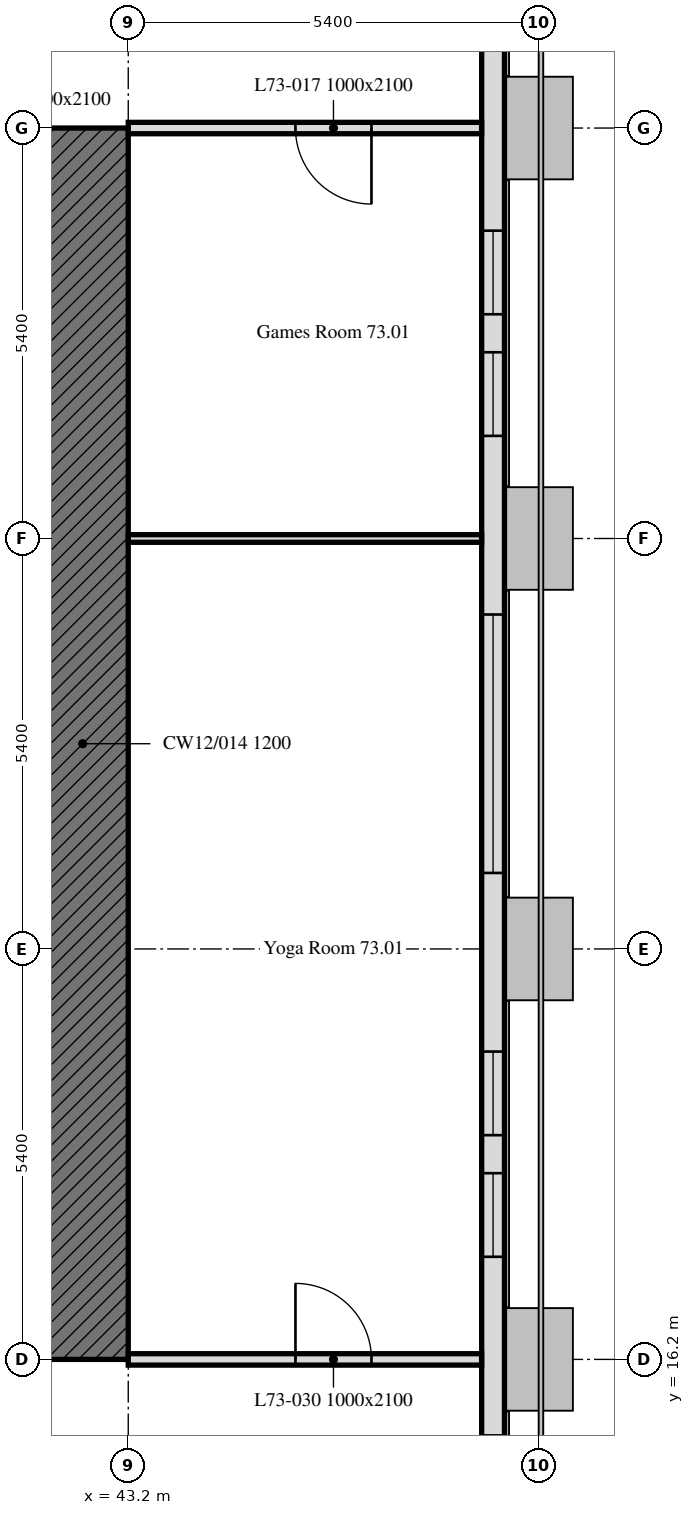
"""IFC4 building model, lengths in metres.
Left out: names, types, materials, properties, quantities, classifications, styles, units other than length and angle.
Written with IfcOpenShell. Run it as: python <this file> out.ifc"""

import sys

from ifc_helpers import new_model, si_unit, direction, frame, frame_2d, origin, place, context, subcontext, project, spatial, rectangle, extrude, element, fill, save


model = new_model("IFC4")
c1 = context("Model", 3, precision=1e-05, world=origin(), true_north=direction((0.0, 1.0)))
c2 = subcontext(c1, "Body", "Model", "MODEL_VIEW")
j1 = project(units=[si_unit("LENGTHUNIT", "METRE"), si_unit("PLANEANGLEUNIT", "RADIAN")], contexts=[c1])
p1 = place(None, origin())
s1 = spatial("IfcSite", under=j1, at=p1, CompositionType="ELEMENT")
p2 = place(p1, origin())
s2 = spatial("IfcBuilding", under=s1, at=p2, CompositionType="ELEMENT")
p3 = place(p2, frame((0.0, 0.0, 295.0)))
s3 = spatial("IfcBuildingStorey", under=s2, at=p3, CompositionType="ELEMENT", Elevation=295.0)
p4 = place(p3, frame((48.0, 10.986, 0.0), z_axis=(0.0, 0.0, 1.0), x_axis=(0.0, 1.0, 0.0)))
e1 = element("IfcWall", 1, at=p4, inside=s3, PredefinedType="SOLIDWALL", context=c2, shape_type="SweptSolid", body=[
    extrude(rectangle(XDim=32.027, YDim=0.3, at=frame_2d((16.014, 0.0))), origin(), (0.0, 0.0, 1.0), 3.0),
])
p5 = place(p4, frame((1.164, 0.0, 0.9)))
e2 = element("IfcOpeningElement", 2, at=p5, cuts=e1, PredefinedType="OPENING", context=c2, shape_type="SweptSolid", body=[
    extrude(rectangle(XDim=1.1, YDim=1.7, at=frame_2d((0.55, 0.85))), frame((0.0, 0.16, 0.0), z_axis=(0.0, -1.0, 0.0), x_axis=(1.0, 0.0, 0.0)), (0.0, 0.0, 1.0), 0.32),
])
p6 = place(p4, frame((3.114, 0.0, 0.9)))
e3 = element("IfcOpeningElement", 3, at=p6, cuts=e1, PredefinedType="OPENING", context=c2, shape_type="SweptSolid", body=[
    extrude(rectangle(XDim=1.1, YDim=1.7, at=frame_2d((0.55, 0.85))), frame((0.0, 0.16, 0.0), z_axis=(0.0, -1.0, 0.0), x_axis=(1.0, 0.0, 0.0)), (0.0, 0.0, 1.0), 0.32),
])
p7 = place(p4, frame((6.564, 0.0, 0.9)))
e4 = element("IfcOpeningElement", 4, at=p7, cuts=e1, PredefinedType="OPENING", context=c2, shape_type="SweptSolid", body=[
    extrude(rectangle(XDim=1.1, YDim=1.7, at=frame_2d((0.55, 0.85))), frame((0.0, 0.16, 0.0), z_axis=(0.0, -1.0, 0.0), x_axis=(1.0, 0.0, 0.0)), (0.0, 0.0, 1.0), 0.32),
])
p8 = place(p4, frame((8.164, 0.0, 0.9)))
e5 = element("IfcOpeningElement", 5, at=p8, cuts=e1, PredefinedType="OPENING", context=c2, shape_type="SweptSolid", body=[
    extrude(rectangle(XDim=1.1, YDim=1.7, at=frame_2d((0.55, 0.85))), frame((0.0, 0.16, 0.0), z_axis=(0.0, -1.0, 0.0), x_axis=(1.0, 0.0, 0.0)), (0.0, 0.0, 1.0), 0.32),
])
p9 = place(p4, frame((11.614, 0.0, 0.9)))
e6 = element("IfcOpeningElement", 6, at=p9, cuts=e1, PredefinedType="OPENING", context=c2, shape_type="SweptSolid", body=[
    extrude(rectangle(XDim=3.4, YDim=1.7, at=frame_2d((1.7, 0.85))), frame((0.0, 0.16, 0.0), z_axis=(0.0, -1.0, 0.0), x_axis=(1.0, 0.0, 0.0)), (0.0, 0.0, 1.0), 0.32),
])
p10 = place(p4, frame((17.364, 0.0, 0.9)))
e7 = element("IfcOpeningElement", 7, at=p10, cuts=e1, PredefinedType="OPENING", context=c2, shape_type="SweptSolid", body=[
    extrude(rectangle(XDim=1.1, YDim=1.7, at=frame_2d((0.55, 0.85))), frame((0.0, 0.16, 0.0), z_axis=(0.0, -1.0, 0.0), x_axis=(1.0, 0.0, 0.0)), (0.0, 0.0, 1.0), 0.32),
])
p11 = place(p4, frame((18.964, 0.0, 0.9)))
e8 = element("IfcOpeningElement", 8, at=p11, cuts=e1, PredefinedType="OPENING", context=c2, shape_type="SweptSolid", body=[
    extrude(rectangle(XDim=1.1, YDim=1.7, at=frame_2d((0.55, 0.85))), frame((0.0, 0.16, 0.0), z_axis=(0.0, -1.0, 0.0), x_axis=(1.0, 0.0, 0.0)), (0.0, 0.0, 1.0), 0.32),
])
p12 = place(p4, frame((22.839, 0.0, 0.9)))
e9 = element("IfcOpeningElement", 9, at=p12, cuts=e1, PredefinedType="OPENING", context=c2, shape_type="SweptSolid", body=[
    extrude(rectangle(XDim=0.65, YDim=1.7, at=frame_2d((0.325, 0.85))), frame((0.0, 0.16, 0.0), z_axis=(0.0, -1.0, 0.0), x_axis=(1.0, 0.0, 0.0)), (0.0, 0.0, 1.0), 0.32),
])
p13 = place(p4, frame((24.364, 0.0, 0.9)))
e10 = element("IfcOpeningElement", 10, at=p13, cuts=e1, PredefinedType="OPENING", context=c2, shape_type="SweptSolid", body=[
    extrude(rectangle(XDim=1.1, YDim=1.7, at=frame_2d((0.55, 0.85))), frame((0.0, 0.16, 0.0), z_axis=(0.0, -1.0, 0.0), x_axis=(1.0, 0.0, 0.0)), (0.0, 0.0, 1.0), 0.32),
])
p14 = place(p4, frame((28.164, 0.0, 0.9)))
e11 = element("IfcOpeningElement", 11, at=p14, cuts=e1, PredefinedType="OPENING", context=c2, shape_type="SweptSolid", body=[
    extrude(rectangle(XDim=1.1, YDim=1.7, at=frame_2d((0.55, 0.85))), frame((0.0, 0.16, 0.0), z_axis=(0.0, -1.0, 0.0), x_axis=(1.0, 0.0, 0.0)), (0.0, 0.0, 1.0), 0.32),
])
p15 = place(p4, frame((29.589, 0.0, 0.9)))
e12 = element("IfcOpeningElement", 12, at=p15, cuts=e1, PredefinedType="OPENING", context=c2, shape_type="SweptSolid", body=[
    extrude(rectangle(XDim=0.65, YDim=1.7, at=frame_2d((0.325, 0.85))), frame((0.0, 0.16, 0.0), z_axis=(0.0, -1.0, 0.0), x_axis=(1.0, 0.0, 0.0)), (0.0, 0.0, 1.0), 0.32),
])
p16 = place(p3, frame((42.6, 32.4, 0.0), z_axis=(0.0, 0.0, 1.0), x_axis=(0.0, -1.0, 0.0)))
e13 = element("IfcWall", 13, at=p16, inside=s3, PredefinedType="SOLIDWALL", context=c2, shape_type="SweptSolid", body=[
    extrude(rectangle(XDim=16.2, YDim=1.2, at=frame_2d((8.1, 0.0))), origin(), (0.0, 0.0, 1.0), 3.0),
])
p17 = place(p3, frame((47.849, 32.4, 0.0), z_axis=(0.0, 0.0, 1.0), x_axis=(-1.0, 0.0, 0.0)))
e14 = element("IfcWall", 14, at=p17, inside=s3, PredefinedType="PARTITIONING", context=c2, shape_type="SweptSolid", body=[
    extrude(rectangle(XDim=4.649, YDim=0.15, at=frame_2d((2.325, 0.0))), origin(), (0.0, 0.0, 1.0), 2.4),
])
p18 = place(p17, frame((1.449, 0.0, 0.0)))
e15 = element("IfcOpeningElement", 15, at=p18, cuts=e14, PredefinedType="OPENING", context=c2, shape_type="SweptSolid", body=[
    extrude(rectangle(XDim=1.0, YDim=2.1, at=frame_2d((0.5, 1.05))), frame((0.0, 0.075, 0.0), z_axis=(0.0, -1.0, 0.0), x_axis=(1.0, 0.0, 0.0)), (0.0, 0.0, 1.0), 0.15),
])
p19 = place(p3, frame((43.2, 27.0, 0.0), z_axis=(0.0, 0.0, 1.0), x_axis=(1.0, 0.0, 0.0)))
e16 = element("IfcWall", 16, at=p19, inside=s3, PredefinedType="PARTITIONING", context=c2, shape_type="SweptSolid", body=[
    extrude(rectangle(XDim=4.649, YDim=0.1, at=frame_2d((2.325, 0.0))), origin(), (0.0, 0.0, 1.0), 2.4),
])
p20 = place(p3, frame((43.2, 16.2, 0.0), z_axis=(0.0, 0.0, 1.0), x_axis=(1.0, 0.0, 0.0)))
e17 = element("IfcWall", 17, at=p20, inside=s3, PredefinedType="PARTITIONING", context=c2, shape_type="SweptSolid", body=[
    extrude(rectangle(XDim=4.649, YDim=0.15, at=frame_2d((2.325, 0.0))), origin(), (0.0, 0.0, 1.0), 2.4),
])
p21 = place(p20, frame((2.2, 0.0, 0.0)))
e18 = element("IfcOpeningElement", 18, at=p21, cuts=e17, PredefinedType="OPENING", context=c2, shape_type="SweptSolid", body=[
    extrude(rectangle(XDim=1.0, YDim=2.1, at=frame_2d((0.5, 1.05))), frame((0.0, 0.075, 0.0), z_axis=(0.0, -1.0, 0.0), x_axis=(1.0, 0.0, 0.0)), (0.0, 0.0, 1.0), 0.15),
])
p22 = place(p7, origin())
e19 = element("IfcWindow", 19, at=p22, inside=s3, PartitioningType="SINGLE_PANEL", PredefinedType="WINDOW", context=c2, shape_type="SweptSolid", body=[
    extrude(rectangle(XDim=1.1, YDim=1.7, at=frame_2d((0.55, 0.85))), frame((0.0, 0.03, 0.0), z_axis=(0.0, -1.0, 0.0), x_axis=(1.0, 0.0, 0.0)), (0.0, 0.0, 1.0), 0.06),
])
fill(e4, e19)
p23 = place(p8, origin())
e20 = element("IfcWindow", 20, at=p23, inside=s3, PartitioningType="SINGLE_PANEL", PredefinedType="WINDOW", context=c2, shape_type="SweptSolid", body=[
    extrude(rectangle(XDim=1.1, YDim=1.7, at=frame_2d((0.55, 0.85))), frame((0.0, 0.03, 0.0), z_axis=(0.0, -1.0, 0.0), x_axis=(1.0, 0.0, 0.0)), (0.0, 0.0, 1.0), 0.06),
])
fill(e5, e20)
p24 = place(p9, origin())
e21 = element("IfcWindow", 21, at=p24, inside=s3, PartitioningType="SINGLE_PANEL", PredefinedType="WINDOW", context=c2, shape_type="SweptSolid", body=[
    extrude(rectangle(XDim=3.4, YDim=1.7, at=frame_2d((1.7, 0.85))), frame((0.0, 0.03, 0.0), z_axis=(0.0, -1.0, 0.0), x_axis=(1.0, 0.0, 0.0)), (0.0, 0.0, 1.0), 0.06),
])
fill(e6, e21)
p25 = place(p10, origin())
e22 = element("IfcWindow", 22, at=p25, inside=s3, PartitioningType="SINGLE_PANEL", PredefinedType="WINDOW", context=c2, shape_type="SweptSolid", body=[
    extrude(rectangle(XDim=1.1, YDim=1.7, at=frame_2d((0.55, 0.85))), frame((0.0, 0.03, 0.0), z_axis=(0.0, -1.0, 0.0), x_axis=(1.0, 0.0, 0.0)), (0.0, 0.0, 1.0), 0.06),
])
fill(e7, e22)
p26 = place(p11, origin())
e23 = element("IfcWindow", 23, at=p26, inside=s3, PartitioningType="SINGLE_PANEL", PredefinedType="WINDOW", context=c2, shape_type="SweptSolid", body=[
    extrude(rectangle(XDim=1.1, YDim=1.7, at=frame_2d((0.55, 0.85))), frame((0.0, 0.03, 0.0), z_axis=(0.0, -1.0, 0.0), x_axis=(1.0, 0.0, 0.0)), (0.0, 0.0, 1.0), 0.06),
])
fill(e8, e23)
p27 = place(p18, origin())
e24 = element("IfcDoor", 24, at=p27, inside=s3, OperationType="SINGLE_SWING_LEFT", PredefinedType="DOOR", context=c2, shape_type="SweptSolid", body=[
    extrude(rectangle(XDim=1.0, YDim=2.1, at=frame_2d((0.5, 1.05))), frame((0.0, 0.025, 0.0), z_axis=(0.0, -1.0, 0.0), x_axis=(1.0, 0.0, 0.0)), (0.0, 0.0, 1.0), 0.05),
])
fill(e15, e24)
p28 = place(p21, origin())
e25 = element("IfcDoor", 25, at=p28, inside=s3, OperationType="SINGLE_SWING_LEFT", PredefinedType="DOOR", context=c2, shape_type="SweptSolid", body=[
    extrude(rectangle(XDim=1.0, YDim=2.1, at=frame_2d((0.5, 1.05))), frame((0.0, 0.025, 0.0), z_axis=(0.0, -1.0, 0.0), x_axis=(1.0, 0.0, 0.0)), (0.0, 0.0, 1.0), 0.05),
])
fill(e18, e25)
save(model, sys.argv[1])
